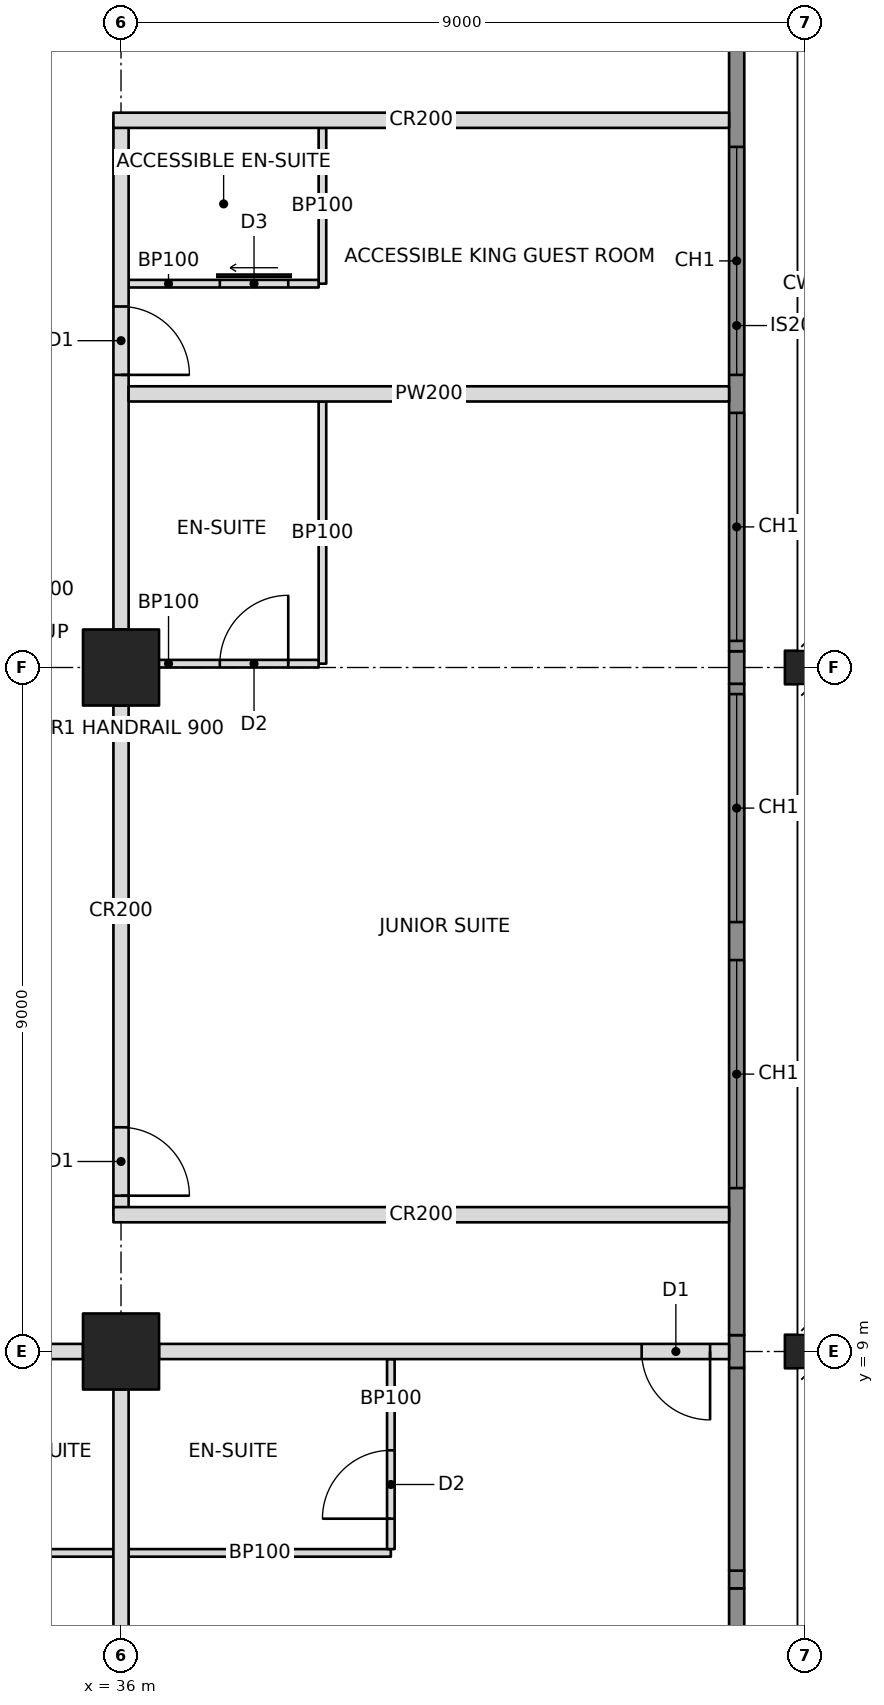
"""IFC4 building model, lengths in metres.
Left out: names, types, materials, properties, quantities, classifications, styles, units other than length and angle.
Written with IfcOpenShell. Run it as: python <this file> out.ifc"""

import sys

from ifc_helpers import new_model, si_unit, direction, frame, frame_2d, origin, origin_2d, place, context, subcontext, project, spatial, rectangle, hollow_rectangle, i_section, extrude, element, fill, save


model = new_model("IFC4")
c1 = context("Model", 3, precision=1e-05, world=origin(), true_north=direction((0.0, 1.0)))
c2 = subcontext(c1, "Body", "Model", "MODEL_VIEW")
j1 = project(units=[si_unit("LENGTHUNIT", "METRE"), si_unit("PLANEANGLEUNIT", "RADIAN")], contexts=[c1])
p1 = place(None, origin())
s1 = spatial("IfcSite", under=j1, at=p1, CompositionType="ELEMENT")
p2 = place(p1, origin())
s2 = spatial("IfcBuilding", under=s1, at=p2, CompositionType="ELEMENT")
p3 = place(p2, frame((0.0, 0.0, 152.0)))
s3 = spatial("IfcBuildingStorey", under=s2, at=p3, CompositionType="ELEMENT", Elevation=152.0)
for number, where, z_axis, x_axis in (
    (1, (36.0, 9.0, 0.0), (0.0, 0.0, 1.0), (0.0, 1.0, 0.0)),
    (2, (36.0, 18.0, 0.0), (0.0, 0.0, 1.0), (0.0, 1.0, 0.0)),
):
    element("IfcColumn", number, at=place(p3, frame(where, z_axis=z_axis, x_axis=x_axis)), inside=s3, PredefinedType="COLUMN", context=c2, shape_type="SweptSolid", body=[
        extrude(hollow_rectangle(XDim=1.0, YDim=1.0, WallThickness=0.1, at=origin_2d()), origin(), (0.0, 0.0, 1.0), 3.4),
    ])
for number, where, z_axis, x_axis in (
    (3, (45.0, 9.0, 0.0), (0.0, 0.0, 1.0), (0.0, 1.0, 0.0)),
    (4, (45.0, 18.0, 0.0), (0.0, 0.0, 1.0), (0.0, 1.0, 0.0)),
):
    element("IfcColumn", number, at=place(p3, frame(where, z_axis=z_axis, x_axis=x_axis)), inside=s3, PredefinedType="COLUMN", context=c2, shape_type="SweptSolid", body=[
        extrude(i_section(OverallWidth=0.442, OverallDepth=0.531, WebThickness=0.066, FlangeThickness=0.106, at=origin_2d()), origin(), (0.0, 0.0, 1.0), 3.4),
    ])
p4 = place(p3, frame((27.5, 9.0, 0.0), z_axis=(0.0, 0.0, 1.0), x_axis=(1.0, 0.0, 0.0)))
e5 = element("IfcWall", 5, at=p4, inside=s3, PredefinedType="PARTITIONING", context=c2, shape_type="SweptSolid", body=[
    extrude(rectangle(XDim=8.0, YDim=0.2, at=frame_2d((4.0, 0.0))), origin(), (0.0, 0.0, 1.0), 2.21),
])
p5 = place(p4, frame((4.25, 0.0, 0.0)))
e6 = element("IfcOpeningElement", 6, at=p5, cuts=e5, PredefinedType="OPENING", context=c2, shape_type="SweptSolid", body=[
    extrude(rectangle(XDim=0.9, YDim=2.1, at=frame_2d((0.45, 1.05))), frame((0.0, 0.11, 0.0), z_axis=(0.0, -1.0, 0.0), x_axis=(1.0, 0.0, 0.0)), (0.0, 0.0, 1.0), 0.22),
])
p6 = place(p3, frame((36.5, 9.0, 0.0), z_axis=(0.0, 0.0, 1.0), x_axis=(1.0, 0.0, 0.0)))
e7 = element("IfcWall", 7, at=p6, inside=s3, PredefinedType="PARTITIONING", context=c2, shape_type="SweptSolid", body=[
    extrude(rectangle(XDim=7.5, YDim=0.2, at=frame_2d((3.75, 0.0))), origin(), (0.0, 0.0, 1.0), 2.21),
])
p7 = place(p6, frame((6.35, 0.0, 0.0)))
e8 = element("IfcOpeningElement", 8, at=p7, cuts=e7, PredefinedType="OPENING", context=c2, shape_type="SweptSolid", body=[
    extrude(rectangle(XDim=0.9, YDim=2.1, at=frame_2d((0.45, 1.05))), frame((0.0, 0.11, 0.0), z_axis=(0.0, -1.0, 0.0), x_axis=(1.0, 0.0, 0.0)), (0.0, 0.0, 1.0), 0.22),
])
p8 = place(p3, frame((36.0, 10.8, 0.0), z_axis=(0.0, 0.0, 1.0), x_axis=(0.0, 1.0, 0.0)))
e9 = element("IfcWall", 9, at=p8, inside=s3, PredefinedType="PARTITIONING", context=c2, shape_type="SweptSolid", body=[
    extrude(rectangle(XDim=6.7, YDim=0.2, at=frame_2d((3.35, 0.0))), origin(), (0.0, 0.0, 1.0), 2.21),
])
p9 = place(p8, frame((0.25, 0.0, 0.0)))
e10 = element("IfcOpeningElement", 10, at=p9, cuts=e9, PredefinedType="OPENING", context=c2, shape_type="SweptSolid", body=[
    extrude(rectangle(XDim=0.9, YDim=2.1, at=frame_2d((0.45, 1.05))), frame((0.0, 0.11, 0.0), z_axis=(0.0, -1.0, 0.0), x_axis=(1.0, 0.0, 0.0)), (0.0, 0.0, 1.0), 0.22),
])
p10 = place(p3, frame((36.0, 18.5, 0.0), z_axis=(0.0, 0.0, 1.0), x_axis=(0.0, 1.0, 0.0)))
e11 = element("IfcWall", 11, at=p10, inside=s3, PredefinedType="PARTITIONING", context=c2, shape_type="SweptSolid", body=[
    extrude(rectangle(XDim=6.7, YDim=0.2, at=frame_2d((3.35, 0.0))), origin(), (0.0, 0.0, 1.0), 2.21),
])
p11 = place(p10, frame((3.35, 0.0, 0.0)))
e12 = element("IfcOpeningElement", 12, at=p11, cuts=e11, PredefinedType="OPENING", context=c2, shape_type="SweptSolid", body=[
    extrude(rectangle(XDim=0.9, YDim=2.1, at=frame_2d((0.45, 1.05))), frame((0.0, 0.11, 0.0), z_axis=(0.0, -1.0, 0.0), x_axis=(1.0, 0.0, 0.0)), (0.0, 0.0, 1.0), 0.22),
])
for number, where, z_axis, x_axis in (
    (13, (35.9, 10.8, 0.0), (0.0, 0.0, 1.0), (1.0, 0.0, 0.0)),
    (14, (35.9, 25.2, 0.0), (0.0, 0.0, 1.0), (1.0, 0.0, 0.0)),
):
    element("IfcWall", number, at=place(p3, frame(where, z_axis=z_axis, x_axis=x_axis)), inside=s3, PredefinedType="PARTITIONING", context=c2, shape_type="SweptSolid", body=[
        extrude(rectangle(XDim=8.1, YDim=0.2, at=frame_2d((4.05, 0.0))), origin(), (0.0, 0.0, 1.0), 2.21),
    ])
p12 = place(p3, frame((36.0, 8.5, 0.0), z_axis=(0.0, 0.0, 1.0), x_axis=(0.0, -1.0, 0.0)))
e15 = element("IfcWall", 15, at=p12, inside=s3, PredefinedType="PARTITIONING", context=c2, shape_type="SweptSolid", body=[
    extrude(rectangle(XDim=7.5, YDim=0.2, at=frame_2d((3.75, 0.0))), origin(), (0.0, 0.0, 1.0), 2.21),
])
p13 = place(p3, frame((32.95, 6.35, 0.0), z_axis=(0.0, 0.0, 1.0), x_axis=(1.0, 0.0, 0.0)))
e16 = element("IfcWall", 16, at=p13, inside=s3, PredefinedType="PARTITIONING", context=c2, shape_type="SweptSolid", body=[
    extrude(rectangle(XDim=2.95, YDim=0.1, at=frame_2d((1.475, 0.0))), origin(), (0.0, 0.0, 1.0), 2.21),
])
p14 = place(p3, frame((36.1, 6.35, 0.0), z_axis=(0.0, 0.0, 1.0), x_axis=(1.0, 0.0, 0.0)))
e17 = element("IfcWall", 17, at=p14, inside=s3, PredefinedType="PARTITIONING", context=c2, shape_type="SweptSolid", body=[
    extrude(rectangle(XDim=3.45, YDim=0.1, at=frame_2d((1.725, 0.0))), origin(), (0.0, 0.0, 1.0), 2.21),
])
p15 = place(p3, frame((39.55, 8.9, 0.0), z_axis=(0.0, 0.0, 1.0), x_axis=(0.0, -1.0, 0.0)))
e18 = element("IfcWall", 18, at=p15, inside=s3, PredefinedType="PARTITIONING", context=c2, shape_type="SweptSolid", body=[
    extrude(rectangle(XDim=2.5, YDim=0.1, at=frame_2d((1.25, 0.0))), origin(), (0.0, 0.0, 1.0), 2.21),
])
p16 = place(p15, frame((1.2, 0.0, 0.0)))
e19 = element("IfcOpeningElement", 19, at=p16, cuts=e18, PredefinedType="OPENING", context=c2, shape_type="SweptSolid", body=[
    extrude(rectangle(XDim=0.9, YDim=2.1, at=frame_2d((0.45, 1.05))), frame((0.0, 0.06, 0.0), z_axis=(0.0, -1.0, 0.0), x_axis=(1.0, 0.0, 0.0)), (0.0, 0.0, 1.0), 0.12),
])
p17 = place(p3, frame((36.1, 21.6, 0.0), z_axis=(0.0, 0.0, 1.0), x_axis=(1.0, 0.0, 0.0)))
e20 = element("IfcWall", 20, at=p17, inside=s3, PredefinedType="PARTITIONING", context=c2, shape_type="SweptSolid", body=[
    extrude(rectangle(XDim=7.9, YDim=0.2, at=frame_2d((3.95, 0.0))), origin(), (0.0, 0.0, 1.0), 2.21),
])
p18 = place(p3, frame((38.65, 18.05, 0.0), z_axis=(0.0, 0.0, 1.0), x_axis=(0.0, 1.0, 0.0)))
e21 = element("IfcWall", 21, at=p18, inside=s3, PredefinedType="PARTITIONING", context=c2, shape_type="SweptSolid", body=[
    extrude(rectangle(XDim=3.45, YDim=0.1, at=frame_2d((1.725, 0.0))), origin(), (0.0, 0.0, 1.0), 2.202),
])
p19 = place(p3, frame((36.1, 18.05, 0.0), z_axis=(0.0, 0.0, 1.0), x_axis=(1.0, 0.0, 0.0)))
e22 = element("IfcWall", 22, at=p19, inside=s3, PredefinedType="PARTITIONING", context=c2, shape_type="SweptSolid", body=[
    extrude(rectangle(XDim=2.5, YDim=0.1, at=frame_2d((1.25, 0.0))), origin(), (0.0, 0.0, 1.0), 2.203),
])
p20 = place(p19, frame((1.2, 0.0, 0.0)))
e23 = element("IfcOpeningElement", 23, at=p20, cuts=e22, PredefinedType="OPENING", context=c2, shape_type="SweptSolid", body=[
    extrude(rectangle(XDim=0.9, YDim=2.1, at=frame_2d((0.45, 1.05))), frame((0.0, 0.06, 0.0), z_axis=(0.0, -1.0, 0.0), x_axis=(1.0, 0.0, 0.0)), (0.0, 0.0, 1.0), 0.12),
])
p21 = place(p3, frame((38.65, 23.05, 0.0), z_axis=(0.0, 0.0, 1.0), x_axis=(0.0, 1.0, 0.0)))
e24 = element("IfcWall", 24, at=p21, inside=s3, PredefinedType="PARTITIONING", context=c2, shape_type="SweptSolid", body=[
    extrude(rectangle(XDim=2.05, YDim=0.1, at=frame_2d((1.025, 0.0))), origin(), (0.0, 0.0, 1.0), 3.15),
])
p22 = place(p3, frame((36.1, 23.05, 0.0), z_axis=(0.0, 0.0, 1.0), x_axis=(1.0, 0.0, 0.0)))
e25 = element("IfcWall", 25, at=p22, inside=s3, PredefinedType="PARTITIONING", context=c2, shape_type="SweptSolid", body=[
    extrude(rectangle(XDim=2.5, YDim=0.1, at=frame_2d((1.25, 0.0))), origin(), (0.0, 0.0, 1.0), 2.21),
])
p23 = place(p22, frame((1.2, 0.0, 0.0)))
e26 = element("IfcOpeningElement", 26, at=p23, cuts=e25, PredefinedType="OPENING", context=c2, shape_type="SweptSolid", body=[
    extrude(rectangle(XDim=0.9, YDim=2.1, at=frame_2d((0.45, 1.05))), frame((0.0, 0.06, 0.0), z_axis=(0.0, -1.0, 0.0), x_axis=(1.0, 0.0, 0.0)), (0.0, 0.0, 1.0), 0.12),
])
p24 = place(p3, frame((44.1, 3.116, 0.0), z_axis=(0.0, 0.0, 1.0), x_axis=(0.0, 1.0, 0.0)))
e27 = element("IfcWall", 27, at=p24, inside=s3, PredefinedType="SOLIDWALL", context=c2, shape_type="SweptSolid", body=[
    extrude(rectangle(XDim=2.768, YDim=0.2, at=frame_2d((1.384, 0.0))), origin(), (0.0, 0.0, 1.0), 3.15),
])
p25 = place(p3, frame((44.1, 5.884, 0.0), z_axis=(0.0, 0.0, 1.0), x_axis=(0.0, 1.0, 0.0)))
e28 = element("IfcWall", 28, at=p25, inside=s3, PredefinedType="SOLIDWALL", context=c2, shape_type="SweptSolid", body=[
    extrude(rectangle(XDim=0.232, YDim=0.2, at=frame_2d((0.116, 0.0))), origin(), (0.0, 0.0, 1.0), 2.542),
])
p26 = place(p3, frame((44.1, 6.116, 0.0), z_axis=(0.0, 0.0, 1.0), x_axis=(0.0, 1.0, 0.0)))
e29 = element("IfcWall", 29, at=p26, inside=s3, PredefinedType="SOLIDWALL", context=c2, shape_type="SweptSolid", body=[
    extrude(rectangle(XDim=2.668, YDim=0.2, at=frame_2d((1.334, 0.0))), origin(), (0.0, 0.0, 1.0), 3.15),
])
p27 = place(p3, frame((44.1, 8.785, 0.0), z_axis=(0.0, 0.0, 1.0), x_axis=(0.0, 1.0, 0.0)))
e30 = element("IfcWall", 30, at=p27, inside=s3, PredefinedType="SOLIDWALL", context=c2, shape_type="SweptSolid", body=[
    extrude(rectangle(XDim=0.431, YDim=0.2, at=frame_2d((0.215, 0.0))), origin(), (0.0, 0.0, 1.0), 2.21),
])
p28 = place(p3, frame((44.1, 9.215, 0.0), z_axis=(0.0, 0.0, 1.0), x_axis=(0.0, 1.0, 0.0)))
e31 = element("IfcWall", 31, at=p28, inside=s3, PredefinedType="SOLIDWALL", context=c2, shape_type="SweptSolid", body=[
    extrude(rectangle(XDim=8.571, YDim=0.2, at=frame_2d((4.285, 0.0))), origin(), (0.0, 0.0, 1.0), 3.15),
])
p29 = place(p28, frame((1.935, 0.0, 0.6)))
e32 = element("IfcOpeningElement", 32, at=p29, cuts=e31, PredefinedType="OPENING", context=c2, shape_type="SweptSolid", body=[
    extrude(rectangle(XDim=3.0, YDim=2.2, at=frame_2d((1.5, 1.1))), frame((0.0, 0.11, 0.0), z_axis=(0.0, -1.0, 0.0), x_axis=(1.0, 0.0, 0.0)), (0.0, 0.0, 1.0), 0.22),
])
p30 = place(p28, frame((5.435, 0.0, 0.6)))
e33 = element("IfcOpeningElement", 33, at=p30, cuts=e31, PredefinedType="OPENING", context=c2, shape_type="SweptSolid", body=[
    extrude(rectangle(XDim=3.0, YDim=2.2, at=frame_2d((1.5, 1.1))), frame((0.0, 0.11, 0.0), z_axis=(0.0, -1.0, 0.0), x_axis=(1.0, 0.0, 0.0)), (0.0, 0.0, 1.0), 0.22),
])
p31 = place(p3, frame((44.1, 17.786, 0.0), z_axis=(0.0, 0.0, 1.0), x_axis=(0.0, 1.0, 0.0)))
e34 = element("IfcWall", 34, at=p31, inside=s3, PredefinedType="SOLIDWALL", context=c2, shape_type="SweptSolid", body=[
    extrude(rectangle(XDim=0.428, YDim=0.2, at=frame_2d((0.214, 0.0))), origin(), (0.0, 0.0, 1.0), 2.202),
])
p32 = place(p3, frame((44.1, 18.214, 0.0), z_axis=(0.0, 0.0, 1.0), x_axis=(0.0, 1.0, 0.0)))
e35 = element("IfcWall", 35, at=p32, inside=s3, PredefinedType="SOLIDWALL", context=c2, shape_type="SweptSolid", body=[
    extrude(rectangle(XDim=8.571, YDim=0.2, at=frame_2d((4.285, 0.0))), origin(), (0.0, 0.0, 1.0), 3.15),
])
p33 = place(p32, frame((0.136, 0.0, 0.6)))
e36 = element("IfcOpeningElement", 36, at=p33, cuts=e35, PredefinedType="OPENING", context=c2, shape_type="SweptSolid", body=[
    extrude(rectangle(XDim=3.0, YDim=2.2, at=frame_2d((1.5, 1.1))), frame((0.0, 0.11, 0.0), z_axis=(0.0, -1.0, 0.0), x_axis=(1.0, 0.0, 0.0)), (0.0, 0.0, 1.0), 0.22),
])
p34 = place(p32, frame((3.636, 0.0, 0.6)))
e37 = element("IfcOpeningElement", 37, at=p34, cuts=e35, PredefinedType="OPENING", context=c2, shape_type="SweptSolid", body=[
    extrude(rectangle(XDim=3.0, YDim=2.2, at=frame_2d((1.5, 1.1))), frame((0.0, 0.11, 0.0), z_axis=(0.0, -1.0, 0.0), x_axis=(1.0, 0.0, 0.0)), (0.0, 0.0, 1.0), 0.22),
])
p35 = place(p29, origin())
e38 = element("IfcWindow", 38, at=p35, inside=s3, PartitioningType="TRIPLE_PANEL_VERTICAL", PredefinedType="WINDOW", context=c2, shape_type="SweptSolid", body=[
    extrude(rectangle(XDim=3.0, YDim=2.2, at=frame_2d((1.5, 1.1))), frame((0.0, 0.03, 0.0), z_axis=(0.0, -1.0, 0.0), x_axis=(1.0, 0.0, 0.0)), (0.0, 0.0, 1.0), 0.06),
])
fill(e32, e38)
p36 = place(p30, origin())
e39 = element("IfcWindow", 39, at=p36, inside=s3, PartitioningType="TRIPLE_PANEL_VERTICAL", PredefinedType="WINDOW", context=c2, shape_type="SweptSolid", body=[
    extrude(rectangle(XDim=3.0, YDim=2.2, at=frame_2d((1.5, 1.1))), frame((0.0, 0.03, 0.0), z_axis=(0.0, -1.0, 0.0), x_axis=(1.0, 0.0, 0.0)), (0.0, 0.0, 1.0), 0.06),
])
fill(e33, e39)
p37 = place(p33, origin())
e40 = element("IfcWindow", 40, at=p37, inside=s3, PartitioningType="TRIPLE_PANEL_VERTICAL", PredefinedType="WINDOW", context=c2, shape_type="SweptSolid", body=[
    extrude(rectangle(XDim=3.0, YDim=2.2, at=frame_2d((1.5, 1.1))), frame((0.0, 0.03, 0.0), z_axis=(0.0, -1.0, 0.0), x_axis=(1.0, 0.0, 0.0)), (0.0, 0.0, 1.0), 0.06),
])
fill(e36, e40)
p38 = place(p34, origin())
e41 = element("IfcWindow", 41, at=p38, inside=s3, PartitioningType="TRIPLE_PANEL_VERTICAL", PredefinedType="WINDOW", context=c2, shape_type="SweptSolid", body=[
    extrude(rectangle(XDim=3.0, YDim=2.2, at=frame_2d((1.5, 1.1))), frame((0.0, 0.03, 0.0), z_axis=(0.0, -1.0, 0.0), x_axis=(1.0, 0.0, 0.0)), (0.0, 0.0, 1.0), 0.06),
])
fill(e37, e41)
p39 = place(p16, frame((0.9, 0.0, 0.0), z_axis=(0.0, 0.0, 1.0), x_axis=(-1.0, 0.0, 0.0)))
e42 = element("IfcDoor", 42, at=p39, inside=s3, OperationType="SINGLE_SWING_LEFT", PredefinedType="DOOR", context=c2, shape_type="SweptSolid", body=[
    extrude(rectangle(XDim=0.9, YDim=2.1, at=frame_2d((0.45, 1.05))), frame((0.0, 0.025, 0.0), z_axis=(0.0, -1.0, 0.0), x_axis=(1.0, 0.0, 0.0)), (0.0, 0.0, 1.0), 0.05),
])
fill(e19, e42)
p40 = place(p7, frame((0.9, 0.0, 0.0), z_axis=(0.0, 0.0, 1.0), x_axis=(-1.0, 0.0, 0.0)))
e43 = element("IfcDoor", 43, at=p40, inside=s3, OperationType="SINGLE_SWING_LEFT", PredefinedType="DOOR", context=c2, shape_type="SweptSolid", body=[
    extrude(rectangle(XDim=0.9, YDim=2.1, at=frame_2d((0.45, 1.05))), frame((0.0, 0.025, 0.0), z_axis=(0.0, -1.0, 0.0), x_axis=(1.0, 0.0, 0.0)), (0.0, 0.0, 1.0), 0.05),
])
fill(e8, e43)
p41 = place(p20, origin())
e44 = element("IfcDoor", 44, at=p41, inside=s3, OperationType="SINGLE_SWING_RIGHT", PredefinedType="DOOR", context=c2, shape_type="SweptSolid", body=[
    extrude(rectangle(XDim=0.9, YDim=2.1, at=frame_2d((0.45, 1.05))), frame((0.0, 0.025, 0.0), z_axis=(0.0, -1.0, 0.0), x_axis=(1.0, 0.0, 0.0)), (0.0, 0.0, 1.0), 0.05),
])
fill(e23, e44)
p42 = place(p9, frame((0.9, 0.0, 0.0), z_axis=(0.0, 0.0, 1.0), x_axis=(-1.0, 0.0, 0.0)))
e45 = element("IfcDoor", 45, at=p42, inside=s3, OperationType="SINGLE_SWING_RIGHT", PredefinedType="DOOR", context=c2, shape_type="SweptSolid", body=[
    extrude(rectangle(XDim=0.9, YDim=2.1, at=frame_2d((0.45, 1.05))), frame((0.0, 0.025, 0.0), z_axis=(0.0, -1.0, 0.0), x_axis=(1.0, 0.0, 0.0)), (0.0, 0.0, 1.0), 0.05),
])
fill(e10, e45)
p43 = place(p23, origin())
e46 = element("IfcDoor", 46, at=p43, inside=s3, OperationType="SLIDING_TO_LEFT", PredefinedType="DOOR", context=c2, shape_type="SweptSolid", body=[
    extrude(rectangle(XDim=0.9, YDim=2.1, at=frame_2d((0.45, 1.05))), frame((0.0, 0.025, 0.0), z_axis=(0.0, -1.0, 0.0), x_axis=(1.0, 0.0, 0.0)), (0.0, 0.0, 1.0), 0.05),
])
fill(e26, e46)
p44 = place(p11, frame((0.9, 0.0, 0.0), z_axis=(0.0, 0.0, 1.0), x_axis=(-1.0, 0.0, 0.0)))
e47 = element("IfcDoor", 47, at=p44, inside=s3, OperationType="SINGLE_SWING_RIGHT", PredefinedType="DOOR", context=c2, shape_type="SweptSolid", body=[
    extrude(rectangle(XDim=0.9, YDim=2.1, at=frame_2d((0.45, 1.05))), frame((0.0, 0.025, 0.0), z_axis=(0.0, -1.0, 0.0), x_axis=(1.0, 0.0, 0.0)), (0.0, 0.0, 1.0), 0.05),
])
fill(e12, e47)
save(model, sys.argv[1])
